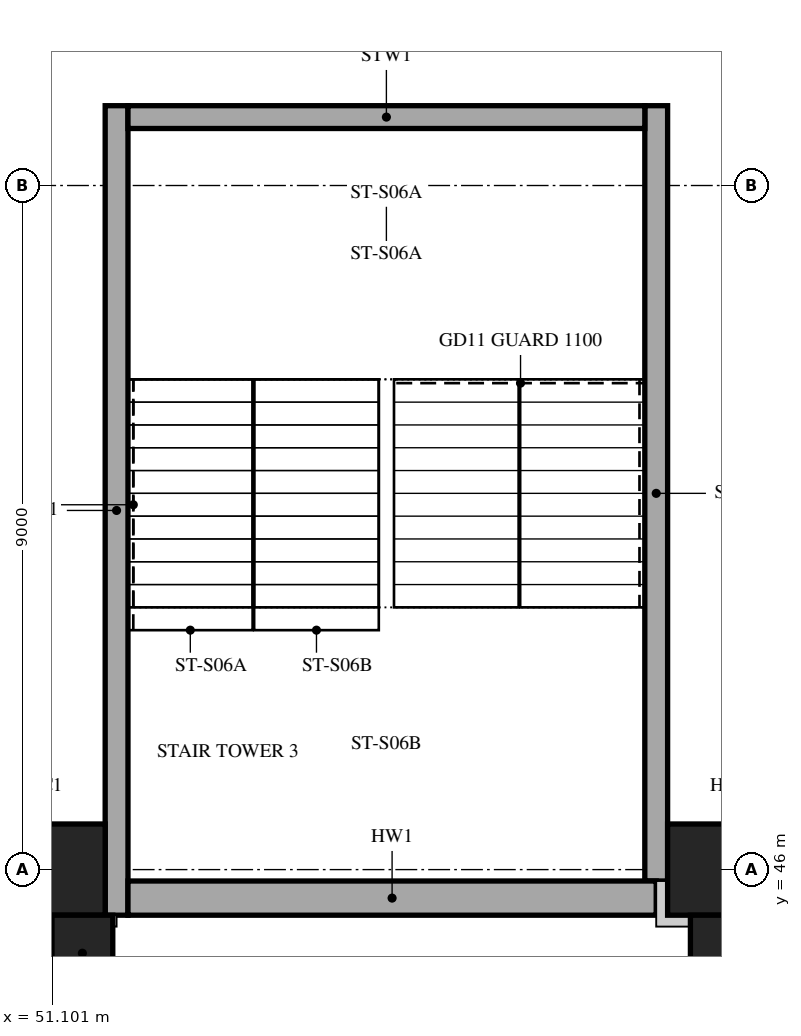
"""IFC4 building model, lengths in metres.
Left out: names, types, materials, properties, quantities, classifications, styles, units other than length and angle.
Written with IfcOpenShell. Run it as: python <this file> out.ifc"""

import sys

from ifc_helpers import new_model, si_unit, direction, frame, frame_2d, origin, origin_2d, place, context, subcontext, project, spatial, rectangle, extrude, element, save


model = new_model("IFC4")
c1 = context("Model", 3, precision=1e-05, world=origin(), true_north=direction((0.0, 1.0)))
c2 = subcontext(c1, "Body", "Model", "MODEL_VIEW")
j1 = project(units=[si_unit("LENGTHUNIT", "METRE"), si_unit("PLANEANGLEUNIT", "RADIAN")], contexts=[c1])
p1 = place(None, origin())
s1 = spatial("IfcSite", under=j1, at=p1, CompositionType="ELEMENT")
p2 = place(p1, origin())
s2 = spatial("IfcBuilding", under=s1, at=p2, CompositionType="ELEMENT")
p3 = place(p2, frame((0.0, 0.0, 10.0)))
s3 = spatial("IfcBuildingStorey", under=s2, at=p3, CompositionType="ELEMENT", Elevation=10.0)
for number, where, z_axis, x_axis in (
    (1, (51.0, 46.0, 0.0), (0.0, 0.0, 1.0), (1.0, 0.0, 0.0)),
    (2, (60.0, 46.0, 0.0), (0.0, 0.0, 1.0), (1.0, 0.0, 0.0)),
):
    element("IfcColumn", number, at=place(p3, frame(where, z_axis=z_axis, x_axis=x_axis)), inside=s3, PredefinedType="COLUMN", context=c2, shape_type="SweptSolid", body=[
        extrude(rectangle(XDim=1.6, YDim=1.2, at=origin_2d()), origin(), (0.0, 0.0, 1.0), 5.0),
    ])
p4 = place(p3, frame((51.95, 45.4, 0.0), z_axis=(0.0, 0.0, 1.0), x_axis=(0.0, 1.0, 0.0)))
e3 = element("IfcWall", 3, at=p4, inside=s3, PredefinedType="SHEAR", context=c2, shape_type="SweptSolid", body=[
    extrude(rectangle(XDim=10.65, YDim=0.3, at=frame_2d((5.325, 0.0))), origin(), (0.0, 0.0, 1.0), 5.0),
])
p5 = place(p3, frame((59.05, 45.85, 0.0), z_axis=(0.0, 0.0, 1.0), x_axis=(0.0, 1.0, 0.0)))
e4 = element("IfcWall", 4, at=p5, inside=s3, PredefinedType="SHEAR", context=c2, shape_type="SweptSolid", body=[
    extrude(rectangle(XDim=10.2, YDim=0.3, at=frame_2d((5.1, 0.0))), origin(), (0.0, 0.0, 1.0), 5.0),
])
p6 = place(p3, frame((52.1, 55.9, 0.0), z_axis=(0.0, 0.0, 1.0), x_axis=(1.0, 0.0, 0.0)))
e5 = element("IfcWall", 5, at=p6, inside=s3, PredefinedType="SHEAR", context=c2, shape_type="SweptSolid", body=[
    extrude(rectangle(XDim=6.8, YDim=0.3, at=frame_2d((3.4, 0.0))), origin(), (0.0, 0.0, 1.0), 5.0),
])
p7 = place(p3, frame((51.5, 44.9, 0.0), z_axis=(0.0, 0.0, 1.0), x_axis=(1.0, 0.0, 0.0)))
e6 = element("IfcColumn", 6, at=p7, inside=s3, PredefinedType="COLUMN", context=c2, shape_type="SweptSolid", body=[
    extrude(rectangle(XDim=0.8, YDim=1.0, at=origin_2d()), origin(), (0.0, 0.0, 1.0), 3.4),
])
p8 = place(p3, frame((60.0, 44.9, 0.0), z_axis=(0.0, 0.0, 1.0), x_axis=(1.0, 0.0, 0.0)))
e7 = element("IfcColumn", 7, at=p8, inside=s3, PredefinedType="COLUMN", context=c2, shape_type="SweptSolid", body=[
    extrude(rectangle(XDim=1.0, YDim=1.0, at=origin_2d()), origin(), (0.0, 0.0, 1.0), 3.4),
])
p9 = place(p3, frame((52.1, 45.625, 0.0), z_axis=(0.0, 0.0, 1.0), x_axis=(1.0, 0.0, 0.0)))
e8 = element("IfcWall", 8, at=p9, inside=s3, PredefinedType="SOLIDWALL", context=c2, shape_type="SweptSolid", body=[
    extrude(rectangle(XDim=6.95, YDim=0.45, at=frame_2d((3.475, 0.0))), origin(), (0.0, 0.0, 1.0), 5.0),
])
save(model, sys.argv[1])
